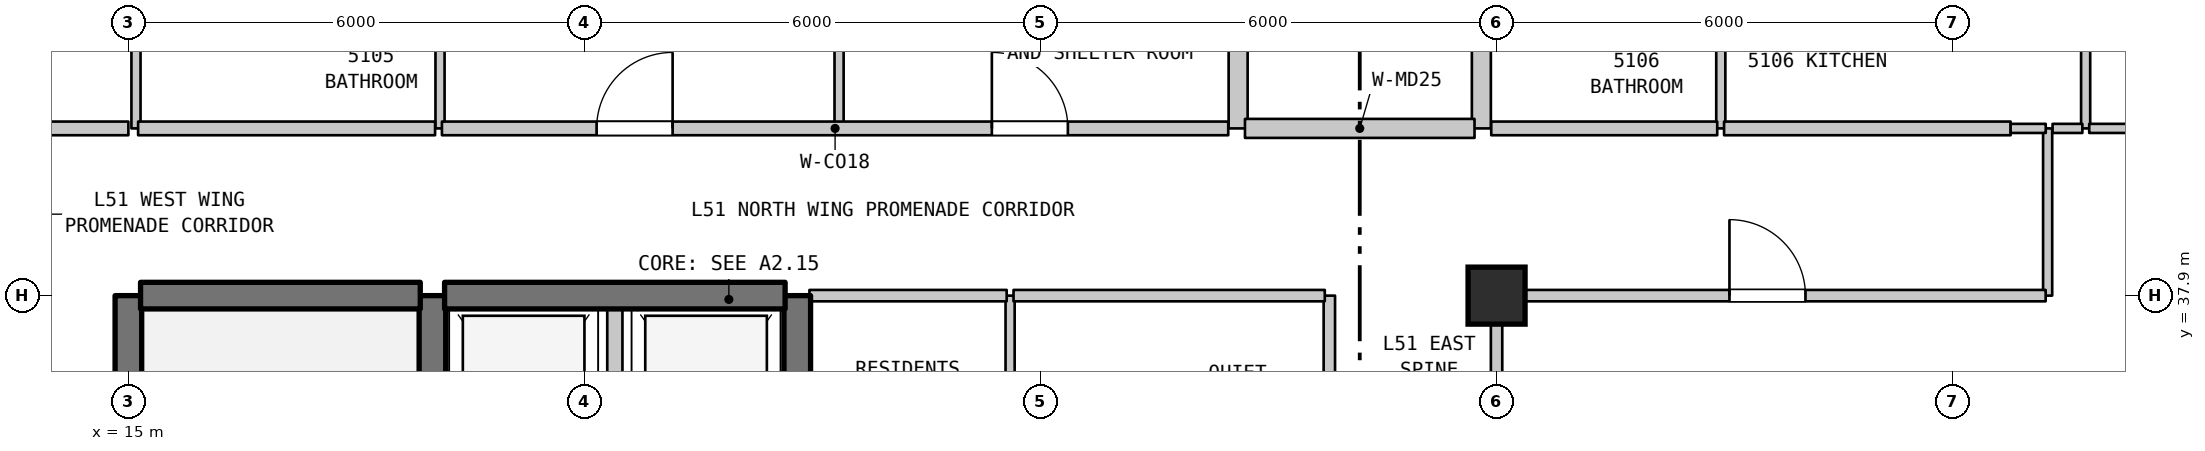
"""IFC4 building model, lengths in metres.
Left out: names, types, materials, properties, quantities, classifications, styles, units other than length and angle.
Written with IfcOpenShell. Run it as: python <this file> out.ifc"""

import sys

from ifc_helpers import new_model, si_unit, direction, frame, frame_2d, origin, origin_2d, place, context, subcontext, project, spatial, rectangle, extrude, element, fill, save


model = new_model("IFC4")
c1 = context("Model", 3, precision=1e-05, world=origin(), true_north=direction((0.0, 1.0)))
c2 = subcontext(c1, "Body", "Model", "MODEL_VIEW")
j1 = project(units=[si_unit("LENGTHUNIT", "METRE"), si_unit("PLANEANGLEUNIT", "RADIAN")], contexts=[c1])
p1 = place(None, origin())
s1 = spatial("IfcSite", under=j1, at=p1, CompositionType="ELEMENT")
p2 = place(p1, origin())
s2 = spatial("IfcBuilding", under=s1, at=p2, CompositionType="ELEMENT")
p3 = place(p2, frame((0.0, 0.0, 206.9)))
s3 = spatial("IfcBuildingStorey", under=s2, at=p3, CompositionType="ELEMENT", Elevation=206.9)
p4 = place(p3, frame((33.0, 37.9, 0.0), z_axis=(0.0, 0.0, 1.0), x_axis=(1.0, 0.0, 0.0)))
e1 = element("IfcColumn", 1, at=p4, inside=s3, PredefinedType="COLUMN", context=c2, shape_type="SweptSolid", body=[
    extrude(rectangle(XDim=0.75, YDim=0.75, at=origin_2d()), origin(), (0.0, 0.0, 1.0), 3.7),
])
p5 = place(p3, frame((15.0, 31.1, 0.0), z_axis=(0.0, 0.0, 1.0), x_axis=(0.0, 1.0, 0.0)))
e2 = element("IfcWall", 2, at=p5, inside=s3, PredefinedType="SHEAR", context=c2, shape_type="SweptSolid", body=[
    extrude(rectangle(XDim=6.8, YDim=0.35, at=frame_2d((3.4, 0.0))), origin(), (0.0, 0.0, 1.0), 3.39),
])
p6 = place(p3, frame((15.1, 40.1, 0.0), z_axis=(0.0, 0.0, 1.0), x_axis=(0.0, 1.0, 0.0)))
e3 = element("IfcWall", 3, at=p6, inside=s3, PredefinedType="PARTITIONING", context=c2, shape_type="SweptSolid", body=[
    extrude(rectangle(XDim=2.3, YDim=0.12, at=frame_2d((1.15, 0.0))), origin(), (0.0, 0.0, 1.0), 3.39),
])
p7 = place(p3, frame((19.0, 35.0, 0.0), z_axis=(0.0, 0.0, 1.0), x_axis=(0.0, 1.0, 0.0)))
e4 = element("IfcWall", 4, at=p7, inside=s3, PredefinedType="SHEAR", context=c2, shape_type="SweptSolid", body=[
    extrude(rectangle(XDim=2.9, YDim=0.35, at=frame_2d((1.45, 0.0))), origin(), (0.0, 0.0, 1.0), 3.39),
])
p8 = place(p3, frame((19.1, 40.1, 0.0), z_axis=(0.0, 0.0, 1.0), x_axis=(0.0, 1.0, 0.0)))
e5 = element("IfcWall", 5, at=p8, inside=s3, PredefinedType="PARTITIONING", context=c2, shape_type="SweptSolid", body=[
    extrude(rectangle(XDim=2.3, YDim=0.12, at=frame_2d((1.15, 0.0))), origin(), (0.0, 0.0, 1.0), 3.39),
])
p9 = place(p3, frame((21.4, 35.0, 0.0), z_axis=(0.0, 0.0, 1.0), x_axis=(0.0, 1.0, 0.0)))
e6 = element("IfcWall", 6, at=p9, inside=s3, PredefinedType="STANDARD", context=c2, shape_type="SweptSolid", body=[
    extrude(rectangle(XDim=2.9, YDim=0.2, at=frame_2d((1.45, 0.0))), origin(), (0.0, 0.0, 1.0), 3.39),
])
p10 = place(p3, frame((23.8, 35.0, 0.0), z_axis=(0.0, 0.0, 1.0), x_axis=(0.0, 1.0, 0.0)))
e7 = element("IfcWall", 7, at=p10, inside=s3, PredefinedType="SHEAR", context=c2, shape_type="SweptSolid", body=[
    extrude(rectangle(XDim=2.9, YDim=0.35, at=frame_2d((1.45, 0.0))), origin(), (0.0, 0.0, 1.0), 3.39),
])
p11 = place(p3, frame((24.35, 40.1, 0.0), z_axis=(0.0, 0.0, 1.0), x_axis=(0.0, 1.0, 0.0)))
e8 = element("IfcWall", 8, at=p11, inside=s3, PredefinedType="PARTITIONING", context=c2, shape_type="SweptSolid", body=[
    extrude(rectangle(XDim=2.05, YDim=0.12, at=frame_2d((1.025, 0.0))), origin(), (0.0, 0.0, 1.0), 3.39),
])
p12 = place(p3, frame((26.6, 35.0, 0.0), z_axis=(0.0, 0.0, 1.0), x_axis=(0.0, 1.0, 0.0)))
e9 = element("IfcWall", 9, at=p12, inside=s3, PredefinedType="PARTITIONING", context=c2, shape_type="SweptSolid", body=[
    extrude(rectangle(XDim=2.9, YDim=0.12, at=frame_2d((1.45, 0.0))), origin(), (0.0, 0.0, 1.0), 3.39),
])
p13 = place(p3, frame((29.6, 40.1, 0.0), z_axis=(0.0, 0.0, 1.0), x_axis=(0.0, 1.0, 0.0)))
e10 = element("IfcWall", 10, at=p13, inside=s3, PredefinedType="STANDARD", context=c2, shape_type="SweptSolid", body=[
    extrude(rectangle(XDim=2.3, YDim=0.25, at=frame_2d((1.15, 0.0))), origin(), (0.0, 0.0, 1.0), 3.39),
])
p14 = place(p3, frame((30.8, 35.0, 0.0), z_axis=(0.0, 0.0, 1.0), x_axis=(0.0, 1.0, 0.0)))
e11 = element("IfcWall", 11, at=p14, inside=s3, PredefinedType="STANDARD", context=c2, shape_type="SweptSolid", body=[
    extrude(rectangle(XDim=2.9, YDim=0.15, at=frame_2d((1.45, 0.0))), origin(), (0.0, 0.0, 1.0), 3.39),
])
p15 = place(p3, frame((32.8, 40.1, 0.0), z_axis=(0.0, 0.0, 1.0), x_axis=(0.0, 1.0, 0.0)))
e12 = element("IfcWall", 12, at=p15, inside=s3, PredefinedType="STANDARD", context=c2, shape_type="SweptSolid", body=[
    extrude(rectangle(XDim=2.3, YDim=0.25, at=frame_2d((1.15, 0.0))), origin(), (0.0, 0.0, 1.0), 3.39),
])
p16 = place(p3, frame((33.0, 32.54, 0.0), z_axis=(0.0, 0.0, 1.0), x_axis=(0.0, 1.0, 0.0)))
e13 = element("IfcWall", 13, at=p16, inside=s3, PredefinedType="STANDARD", context=c2, shape_type="SweptSolid", body=[
    extrude(rectangle(XDim=5.36, YDim=0.15, at=frame_2d((2.68, 0.0))), origin(), (0.0, 0.0, 1.0), 2.89),
])
p17 = place(p16, frame((2.109, 0.0, 0.0)))
e14 = element("IfcOpeningElement", 14, at=p17, cuts=e13, PredefinedType="OPENING", context=c2, shape_type="SweptSolid", body=[
    extrude(rectangle(XDim=1.0, YDim=2.15, at=frame_2d((0.5, 1.075))), frame((0.0, 0.085, 0.0), z_axis=(0.0, -1.0, 0.0), x_axis=(1.0, 0.0, 0.0)), (0.0, 0.0, 1.0), 0.17),
])
p18 = place(p3, frame((35.95, 40.1, 0.0), z_axis=(0.0, 0.0, 1.0), x_axis=(0.0, 1.0, 0.0)))
e15 = element("IfcWall", 15, at=p18, inside=s3, PredefinedType="PARTITIONING", context=c2, shape_type="SweptSolid", body=[
    extrude(rectangle(XDim=2.3, YDim=0.12, at=frame_2d((1.15, 0.0))), origin(), (0.0, 0.0, 1.0), 3.39),
])
p19 = place(p3, frame((40.25, 37.9, 0.0), z_axis=(0.0, 0.0, 1.0), x_axis=(0.0, 1.0, 0.0)))
e16 = element("IfcWall", 16, at=p19, inside=s3, PredefinedType="PARTITIONING", context=c2, shape_type="SweptSolid", body=[
    extrude(rectangle(XDim=2.2, YDim=0.12, at=frame_2d((1.1, 0.0))), origin(), (0.0, 0.0, 1.0), 3.39),
])
p20 = place(p3, frame((40.75, 40.1, 0.0), z_axis=(0.0, 0.0, 1.0), x_axis=(0.0, 1.0, 0.0)))
e17 = element("IfcWall", 17, at=p20, inside=s3, PredefinedType="PARTITIONING", context=c2, shape_type="SweptSolid", body=[
    extrude(rectangle(XDim=2.3, YDim=0.12, at=frame_2d((1.15, 0.0))), origin(), (0.0, 0.0, 1.0), 3.39),
])
p21 = place(p3, frame((15.16, 37.9, 0.0), z_axis=(0.0, 0.0, 1.0), x_axis=(1.0, 0.0, 0.0)))
e18 = element("IfcWall", 18, at=p21, inside=s3, PredefinedType="SHEAR", context=c2, shape_type="SweptSolid", body=[
    extrude(rectangle(XDim=3.68, YDim=0.35, at=frame_2d((1.84, 0.0))), origin(), (0.0, 0.0, 1.0), 3.39),
])
p22 = place(p3, frame((19.16, 37.9, 0.0), z_axis=(0.0, 0.0, 1.0), x_axis=(1.0, 0.0, 0.0)))
e19 = element("IfcWall", 19, at=p22, inside=s3, PredefinedType="SHEAR", context=c2, shape_type="SweptSolid", body=[
    extrude(rectangle(XDim=4.48, YDim=0.35, at=frame_2d((2.24, 0.0))), origin(), (0.0, 0.0, 1.0), 3.39),
])
p23 = place(p3, frame((23.96, 37.9, 0.0), z_axis=(0.0, 0.0, 1.0), x_axis=(1.0, 0.0, 0.0)))
e20 = element("IfcWall", 20, at=p23, inside=s3, PredefinedType="STANDARD", context=c2, shape_type="SweptSolid", body=[
    extrude(rectangle(XDim=2.595, YDim=0.15, at=frame_2d((1.297, 0.0))), origin(), (0.0, 0.0, 1.0), 2.89),
])
p24 = place(p3, frame((26.645, 37.9, 0.0), z_axis=(0.0, 0.0, 1.0), x_axis=(1.0, 0.0, 0.0)))
e21 = element("IfcWall", 21, at=p24, inside=s3, PredefinedType="STANDARD", context=c2, shape_type="SweptSolid", body=[
    extrude(rectangle(XDim=4.095, YDim=0.15, at=frame_2d((2.047, 0.0))), origin(), (0.0, 0.0, 1.0), 2.89),
])
p25 = place(p3, frame((33.06, 37.9, 0.0), z_axis=(0.0, 0.0, 1.0), x_axis=(1.0, 0.0, 0.0)))
e22 = element("IfcWall", 22, at=p25, inside=s3, PredefinedType="STANDARD", context=c2, shape_type="SweptSolid", body=[
    extrude(rectangle(XDim=7.164, YDim=0.15, at=frame_2d((3.582, 0.0))), origin(), (0.0, 0.0, 1.0), 3.39),
])
p26 = place(p25, frame((3.004, 0.0, 0.0)))
e23 = element("IfcOpeningElement", 23, at=p26, cuts=e22, PredefinedType="OPENING", context=c2, shape_type="SweptSolid", body=[
    extrude(rectangle(XDim=1.0, YDim=2.15, at=frame_2d((0.5, 1.075))), frame((0.0, 0.085, 0.0), z_axis=(0.0, -1.0, 0.0), x_axis=(1.0, 0.0, 0.0)), (0.0, 0.0, 1.0), 0.17),
])
p27 = place(p3, frame((12.875, 40.1, 0.0), z_axis=(0.0, 0.0, 1.0), x_axis=(1.0, 0.0, 0.0)))
e24 = element("IfcWall", 24, at=p27, inside=s3, PredefinedType="STANDARD", context=c2, shape_type="SweptSolid", body=[
    extrude(rectangle(XDim=2.125, YDim=0.18, at=frame_2d((1.062, 0.0))), origin(), (0.0, 0.0, 1.0), 3.39),
])
p28 = place(p3, frame((15.128, 40.1, 0.0), z_axis=(0.0, 0.0, 1.0), x_axis=(1.0, 0.0, 0.0)))
e25 = element("IfcWall", 25, at=p28, inside=s3, PredefinedType="STANDARD", context=c2, shape_type="SweptSolid", body=[
    extrude(rectangle(XDim=3.907, YDim=0.18, at=frame_2d((1.954, 0.0))), origin(), (0.0, 0.0, 1.0), 3.39),
])
p29 = place(p3, frame((19.125, 40.1, 0.0), z_axis=(0.0, 0.0, 1.0), x_axis=(1.0, 0.0, 0.0)))
e26 = element("IfcWall", 26, at=p29, inside=s3, PredefinedType="STANDARD", context=c2, shape_type="SweptSolid", body=[
    extrude(rectangle(XDim=10.345, YDim=0.18, at=frame_2d((5.172, 0.0))), origin(), (0.0, 0.0, 1.0), 3.39),
])
p30 = place(p29, frame((2.035, 0.0, 0.0)))
e27 = element("IfcOpeningElement", 27, at=p30, cuts=e26, PredefinedType="OPENING", context=c2, shape_type="SweptSolid", body=[
    extrude(rectangle(XDim=1.0, YDim=2.15, at=frame_2d((0.5, 1.075))), frame((0.0, 0.1, 0.0), z_axis=(0.0, -1.0, 0.0), x_axis=(1.0, 0.0, 0.0)), (0.0, 0.0, 1.0), 0.2),
])
p31 = place(p29, frame((7.235, 0.0, 0.0)))
e28 = element("IfcOpeningElement", 28, at=p31, cuts=e26, PredefinedType="OPENING", context=c2, shape_type="SweptSolid", body=[
    extrude(rectangle(XDim=1.0, YDim=2.15, at=frame_2d((0.5, 1.075))), frame((0.0, 0.1, 0.0), z_axis=(0.0, -1.0, 0.0), x_axis=(1.0, 0.0, 0.0)), (0.0, 0.0, 1.0), 0.2),
])
p32 = place(p3, frame((29.69, 40.1, 0.0), z_axis=(0.0, 0.0, 1.0), x_axis=(1.0, 0.0, 0.0)))
e29 = element("IfcWall", 29, at=p32, inside=s3, PredefinedType="STANDARD", context=c2, shape_type="SweptSolid", body=[
    extrude(rectangle(XDim=3.02, YDim=0.25, at=frame_2d((1.51, 0.0))), origin(), (0.0, 0.0, 1.0), 3.39),
])
p33 = place(p3, frame((32.93, 40.1, 0.0), z_axis=(0.0, 0.0, 1.0), x_axis=(1.0, 0.0, 0.0)))
e30 = element("IfcWall", 30, at=p33, inside=s3, PredefinedType="STANDARD", context=c2, shape_type="SweptSolid", body=[
    extrude(rectangle(XDim=2.973, YDim=0.18, at=frame_2d((1.487, 0.0))), origin(), (0.0, 0.0, 1.0), 3.39),
])
p34 = place(p3, frame((35.993, 40.1, 0.0), z_axis=(0.0, 0.0, 1.0), x_axis=(1.0, 0.0, 0.0)))
e31 = element("IfcWall", 31, at=p34, inside=s3, PredefinedType="STANDARD", context=c2, shape_type="SweptSolid", body=[
    extrude(rectangle(XDim=3.77, YDim=0.18, at=frame_2d((1.885, 0.0))), origin(), (0.0, 0.0, 1.0), 3.39),
])
p35 = place(p3, frame((39.763, 40.1, 0.0), z_axis=(0.0, 0.0, 1.0), x_axis=(1.0, 0.0, 0.0)))
e32 = element("IfcWall", 32, at=p35, inside=s3, PredefinedType="PARTITIONING", context=c2, shape_type="SweptSolid", body=[
    extrude(rectangle(XDim=0.462, YDim=0.12, at=frame_2d((0.231, 0.0))), origin(), (0.0, 0.0, 1.0), 3.39),
])
p36 = place(p3, frame((40.315, 40.1, 0.0), z_axis=(0.0, 0.0, 1.0), x_axis=(1.0, 0.0, 0.0)))
e33 = element("IfcWall", 33, at=p36, inside=s3, PredefinedType="PARTITIONING", context=c2, shape_type="SweptSolid", body=[
    extrude(rectangle(XDim=0.392, YDim=0.12, at=frame_2d((0.196, 0.0))), origin(), (0.0, 0.0, 1.0), 3.39),
])
p37 = place(p3, frame((40.797, 40.1, 0.0), z_axis=(0.0, 0.0, 1.0), x_axis=(1.0, 0.0, 0.0)))
e34 = element("IfcWall", 34, at=p37, inside=s3, PredefinedType="PARTITIONING", context=c2, shape_type="SweptSolid", body=[
    extrude(rectangle(XDim=1.378, YDim=0.12, at=frame_2d((0.689, 0.0))), origin(), (0.0, 0.0, 1.0), 3.39),
])
p38 = place(p26, origin())
e35 = element("IfcDoor", 35, at=p38, inside=s3, OperationType="SINGLE_SWING_LEFT", PredefinedType="DOOR", context=c2, shape_type="SweptSolid", body=[
    extrude(rectangle(XDim=1.0, YDim=2.15, at=frame_2d((0.5, 1.075))), frame((0.0, 0.025, 0.0), z_axis=(0.0, -1.0, 0.0), x_axis=(1.0, 0.0, 0.0)), (0.0, 0.0, 1.0), 0.05),
])
fill(e23, e35)
p39 = place(p30, origin())
e36 = element("IfcDoor", 36, at=p39, inside=s3, OperationType="SINGLE_SWING_RIGHT", PredefinedType="DOOR", context=c2, shape_type="SweptSolid", body=[
    extrude(rectangle(XDim=1.0, YDim=2.15, at=frame_2d((0.5, 1.075))), frame((0.0, 0.025, 0.0), z_axis=(0.0, -1.0, 0.0), x_axis=(1.0, 0.0, 0.0)), (0.0, 0.0, 1.0), 0.05),
])
fill(e27, e36)
p40 = place(p31, origin())
e37 = element("IfcDoor", 37, at=p40, inside=s3, OperationType="SINGLE_SWING_LEFT", PredefinedType="DOOR", context=c2, shape_type="SweptSolid", body=[
    extrude(rectangle(XDim=1.0, YDim=2.15, at=frame_2d((0.5, 1.075))), frame((0.0, 0.025, 0.0), z_axis=(0.0, -1.0, 0.0), x_axis=(1.0, 0.0, 0.0)), (0.0, 0.0, 1.0), 0.05),
])
fill(e28, e37)
save(model, sys.argv[1])
